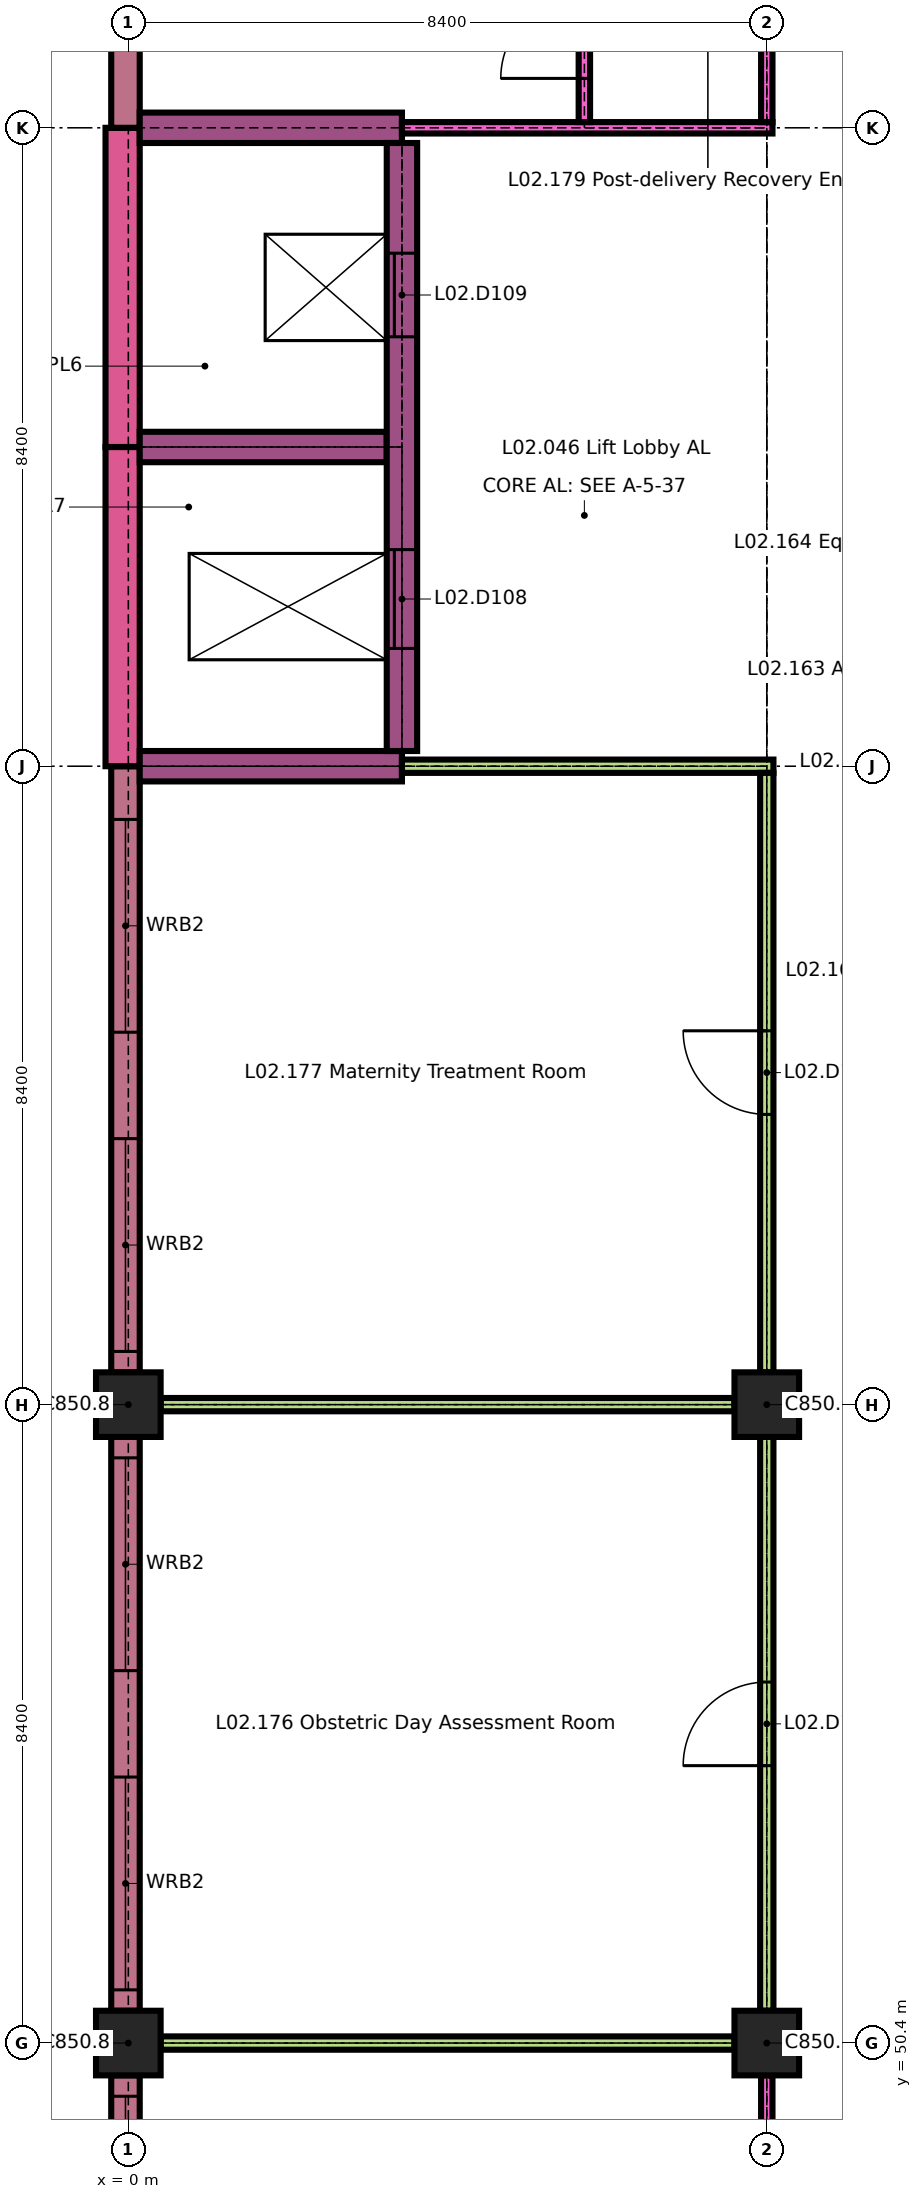
"""IFC4 building model, lengths in metres.
Left out: names, types, materials, properties, quantities, classifications, styles, units other than length and angle.
Written with IfcOpenShell. Run it as: python <this file> out.ifc"""

import sys

from ifc_helpers import new_model, si_unit, direction, frame, frame_2d, origin, origin_2d, place, context, subcontext, project, spatial, rectangle, extrude, element, fill, save


model = new_model("IFC4")
c1 = context("Model", 3, precision=1e-05, world=origin(), true_north=direction((0.0, 1.0)))
c2 = subcontext(c1, "Body", "Model", "MODEL_VIEW")
j1 = project(units=[si_unit("LENGTHUNIT", "METRE"), si_unit("PLANEANGLEUNIT", "RADIAN")], contexts=[c1])
p1 = place(None, origin())
s1 = spatial("IfcSite", under=j1, at=p1, CompositionType="ELEMENT")
p2 = place(p1, origin())
s2 = spatial("IfcBuilding", under=s1, at=p2, CompositionType="ELEMENT")
p3 = place(p2, frame((0.0, 0.0, 8.4)))
s3 = spatial("IfcBuildingStorey", under=s2, at=p3, CompositionType="ELEMENT", Elevation=8.4)
for number, where, z_axis, x_axis in (
    (1, (0.0, 50.4, 0.0), (0.0, 0.0, 1.0), (1.0, 0.0, 0.0)),
    (2, (8.4, 50.4, 0.0), (0.0, 0.0, 1.0), (1.0, 0.0, 0.0)),
    (3, (0.0, 58.8, 0.0), (0.0, 0.0, 1.0), (1.0, 0.0, 0.0)),
    (4, (8.4, 58.8, 0.0), (0.0, 0.0, 1.0), (1.0, 0.0, 0.0)),
):
    element("IfcColumn", number, at=place(p3, frame(where, z_axis=z_axis, x_axis=x_axis)), inside=s3, PredefinedType="COLUMN", context=c2, shape_type="SweptSolid", body=[
        extrude(rectangle(XDim=0.85, YDim=0.85, at=origin_2d()), origin(), (0.0, 0.0, 1.0), 4.2),
    ])
p4 = place(p3, frame((-0.038, 42.425, 0.0), z_axis=(0.0, 0.0, 1.0), x_axis=(0.0, 1.0, 0.0)))
e5 = element("IfcWall", 5, at=p4, inside=s3, PredefinedType="SOLIDWALL", context=c2, shape_type="SweptSolid", body=[
    extrude(rectangle(XDim=7.55, YDim=0.375, at=frame_2d((3.775, 0.0))), origin(), (0.0, 0.0, 1.0), 3.9),
])
p5 = place(p4, frame((0.275, 0.0, 1.0)))
e6 = element("IfcOpeningElement", 6, at=p5, cuts=e5, PredefinedType="OPENING", context=c2, shape_type="SweptSolid", body=[
    extrude(rectangle(XDim=2.8, YDim=1.5, at=frame_2d((1.4, 0.75))), frame((0.0, 0.198, 0.0), z_axis=(0.0, -1.0, 0.0), x_axis=(1.0, 0.0, 0.0)), (0.0, 0.0, 1.0), 0.395),
])
p6 = place(p4, frame((4.475, 0.0, 1.0)))
e7 = element("IfcOpeningElement", 7, at=p6, cuts=e5, PredefinedType="OPENING", context=c2, shape_type="SweptSolid", body=[
    extrude(rectangle(XDim=2.8, YDim=1.5, at=frame_2d((1.4, 0.75))), frame((0.0, 0.198, 0.0), z_axis=(0.0, -1.0, 0.0), x_axis=(1.0, 0.0, 0.0)), (0.0, 0.0, 1.0), 0.395),
])
p7 = place(p3, frame((-0.038, 50.825, 0.0), z_axis=(0.0, 0.0, 1.0), x_axis=(0.0, 1.0, 0.0)))
e8 = element("IfcWall", 8, at=p7, inside=s3, PredefinedType="SOLIDWALL", context=c2, shape_type="SweptSolid", body=[
    extrude(rectangle(XDim=7.55, YDim=0.375, at=frame_2d((3.775, 0.0))), origin(), (0.0, 0.0, 1.0), 3.9),
])
p8 = place(p7, frame((0.275, 0.0, 1.0)))
e9 = element("IfcOpeningElement", 9, at=p8, cuts=e8, PredefinedType="OPENING", context=c2, shape_type="SweptSolid", body=[
    extrude(rectangle(XDim=2.8, YDim=1.5, at=frame_2d((1.4, 0.75))), frame((0.0, 0.198, 0.0), z_axis=(0.0, -1.0, 0.0), x_axis=(1.0, 0.0, 0.0)), (0.0, 0.0, 1.0), 0.395),
])
p9 = place(p7, frame((4.475, 0.0, 1.0)))
e10 = element("IfcOpeningElement", 10, at=p9, cuts=e8, PredefinedType="OPENING", context=c2, shape_type="SweptSolid", body=[
    extrude(rectangle(XDim=2.8, YDim=1.5, at=frame_2d((1.4, 0.75))), frame((0.0, 0.198, 0.0), z_axis=(0.0, -1.0, 0.0), x_axis=(1.0, 0.0, 0.0)), (0.0, 0.0, 1.0), 0.395),
])
p10 = place(p3, frame((-0.038, 59.225, 0.0), z_axis=(0.0, 0.0, 1.0), x_axis=(0.0, 1.0, 0.0)))
e11 = element("IfcWall", 11, at=p10, inside=s3, PredefinedType="SOLIDWALL", context=c2, shape_type="SweptSolid", body=[
    extrude(rectangle(XDim=7.975, YDim=0.375, at=frame_2d((3.987, 0.0))), origin(), (0.0, 0.0, 1.0), 3.9),
])
p11 = place(p10, frame((0.275, 0.0, 1.0)))
e12 = element("IfcOpeningElement", 12, at=p11, cuts=e11, PredefinedType="OPENING", context=c2, shape_type="SweptSolid", body=[
    extrude(rectangle(XDim=2.8, YDim=1.5, at=frame_2d((1.4, 0.75))), frame((0.0, 0.198, 0.0), z_axis=(0.0, -1.0, 0.0), x_axis=(1.0, 0.0, 0.0)), (0.0, 0.0, 1.0), 0.395),
])
p12 = place(p10, frame((4.475, 0.0, 1.0)))
e13 = element("IfcOpeningElement", 13, at=p12, cuts=e11, PredefinedType="OPENING", context=c2, shape_type="SweptSolid", body=[
    extrude(rectangle(XDim=2.8, YDim=1.5, at=frame_2d((1.4, 0.75))), frame((0.0, 0.198, 0.0), z_axis=(0.0, -1.0, 0.0), x_axis=(1.0, 0.0, 0.0)), (0.0, 0.0, 1.0), 0.395),
])
p13 = place(p3, frame((-0.075, 67.2, 0.0), z_axis=(0.0, 0.0, 1.0), x_axis=(0.0, 1.0, 0.0)))
e14 = element("IfcWall", 14, at=p13, inside=s3, PredefinedType="SOLIDWALL", context=c2, shape_type="SweptSolid", body=[
    extrude(rectangle(XDim=4.2, YDim=0.45, at=frame_2d((2.1, 0.0))), origin(), (0.0, 0.0, 1.0), 4.2),
])
p14 = place(p3, frame((-0.075, 71.4, 0.0), z_axis=(0.0, 0.0, 1.0), x_axis=(0.0, 1.0, 0.0)))
e15 = element("IfcWall", 15, at=p14, inside=s3, PredefinedType="SOLIDWALL", context=c2, shape_type="SweptSolid", body=[
    extrude(rectangle(XDim=4.2, YDim=0.45, at=frame_2d((2.1, 0.0))), origin(), (0.0, 0.0, 1.0), 4.2),
])
p15 = place(p3, frame((-0.038, 75.6, 0.0), z_axis=(0.0, 0.0, 1.0), x_axis=(0.0, 1.0, 0.0)))
e16 = element("IfcWall", 16, at=p15, inside=s3, PredefinedType="SOLIDWALL", context=c2, shape_type="SweptSolid", body=[
    extrude(rectangle(XDim=5.25, YDim=0.375, at=frame_2d((2.625, 0.0))), origin(), (0.0, 0.0, 1.0), 3.9),
])
for number, where, z_axis, x_axis in (
    (17, (0.425, 50.4, 0.0), (0.0, 0.0, 1.0), (1.0, 0.0, 0.0)),
    (18, (0.425, 58.8, 0.0), (0.0, 0.0, 1.0), (1.0, 0.0, 0.0)),
):
    element("IfcWall", number, at=place(p3, frame(where, z_axis=z_axis, x_axis=x_axis)), inside=s3, PredefinedType="PARTITIONING", context=c2, shape_type="SweptSolid", body=[
        extrude(rectangle(XDim=7.55, YDim=0.175, at=frame_2d((3.775, 0.0))), origin(), (0.0, 0.0, 1.0), 4.2),
    ])
p16 = place(p3, frame((0.15, 67.2, 0.0), z_axis=(0.0, 0.0, 1.0), x_axis=(1.0, 0.0, 0.0)))
e19 = element("IfcWall", 19, at=p16, inside=s3, PredefinedType="SHEAR", context=c2, shape_type="SweptSolid", body=[
    extrude(rectangle(XDim=3.45, YDim=0.4, at=frame_2d((1.725, 0.0))), origin(), (0.0, 0.0, 1.0), 4.2),
])
p17 = place(p3, frame((3.6, 67.2, 0.0), z_axis=(0.0, 0.0, 1.0), x_axis=(1.0, 0.0, 0.0)))
e20 = element("IfcWall", 20, at=p17, inside=s3, PredefinedType="PARTITIONING", context=c2, shape_type="SweptSolid", body=[
    extrude(rectangle(XDim=4.887, YDim=0.175, at=frame_2d((2.444, 0.0))), origin(), (0.0, 0.0, 1.0), 4.2),
])
p18 = place(p3, frame((0.15, 71.4, 0.0), z_axis=(0.0, 0.0, 1.0), x_axis=(1.0, 0.0, 0.0)))
e21 = element("IfcWall", 21, at=p18, inside=s3, PredefinedType="SHEAR", context=c2, shape_type="SweptSolid", body=[
    extrude(rectangle(XDim=3.25, YDim=0.4, at=frame_2d((1.625, 0.0))), origin(), (0.0, 0.0, 1.0), 4.2),
])
p19 = place(p3, frame((0.15, 75.6, 0.0), z_axis=(0.0, 0.0, 1.0), x_axis=(1.0, 0.0, 0.0)))
e22 = element("IfcWall", 22, at=p19, inside=s3, PredefinedType="SHEAR", context=c2, shape_type="SweptSolid", body=[
    extrude(rectangle(XDim=3.45, YDim=0.4, at=frame_2d((1.725, 0.0))), origin(), (0.0, 0.0, 1.0), 4.2),
])
p20 = place(p3, frame((3.6, 75.6, 0.0), z_axis=(0.0, 0.0, 1.0), x_axis=(1.0, 0.0, 0.0)))
e23 = element("IfcWall", 23, at=p20, inside=s3, PredefinedType="PARTITIONING", context=c2, shape_type="SweptSolid", body=[
    extrude(rectangle(XDim=4.875, YDim=0.15, at=frame_2d((2.438, 0.0))), origin(), (0.0, 0.0, 1.0), 4.2),
])
p21 = place(p3, frame((3.6, 67.4, 0.0), z_axis=(0.0, 0.0, 1.0), x_axis=(0.0, 1.0, 0.0)))
e24 = element("IfcWall", 24, at=p21, inside=s3, PredefinedType="SHEAR", context=c2, shape_type="SweptSolid", body=[
    extrude(rectangle(XDim=8.0, YDim=0.4, at=frame_2d((4.0, 0.0))), origin(), (0.0, 0.0, 1.0), 4.2),
])
p22 = place(p21, frame((1.35, 0.0, 0.0)))
e25 = element("IfcOpeningElement", 25, at=p22, cuts=e24, PredefinedType="OPENING", context=c2, shape_type="SweptSolid", body=[
    extrude(rectangle(XDim=1.3, YDim=2.1, at=frame_2d((0.65, 1.05))), frame((0.0, 0.21, 0.0), z_axis=(0.0, -1.0, 0.0), x_axis=(1.0, 0.0, 0.0)), (0.0, 0.0, 1.0), 0.42),
])
p23 = place(p21, frame((5.45, 0.0, 0.0)))
e26 = element("IfcOpeningElement", 26, at=p23, cuts=e24, PredefinedType="OPENING", context=c2, shape_type="SweptSolid", body=[
    extrude(rectangle(XDim=1.1, YDim=2.1, at=frame_2d((0.55, 1.05))), frame((0.0, 0.21, 0.0), z_axis=(0.0, -1.0, 0.0), x_axis=(1.0, 0.0, 0.0)), (0.0, 0.0, 1.0), 0.42),
])
p24 = place(p3, frame((6.0, 75.675, 0.0), z_axis=(0.0, 0.0, 1.0), x_axis=(0.0, 1.0, 0.0)))
e27 = element("IfcWall", 27, at=p24, inside=s3, PredefinedType="PARTITIONING", context=c2, shape_type="SweptSolid", body=[
    extrude(rectangle(XDim=2.25, YDim=0.15, at=frame_2d((1.125, 0.0))), origin(), (0.0, 0.0, 1.0), 4.2),
])
p25 = place(p24, frame((0.575, 0.0, 0.0)))
e28 = element("IfcOpeningElement", 28, at=p25, cuts=e27, PredefinedType="OPENING", context=c2, shape_type="SweptSolid", body=[
    extrude(rectangle(XDim=1.1, YDim=2.1, at=frame_2d((0.55, 1.05))), frame((0.0, 0.085, 0.0), z_axis=(0.0, -1.0, 0.0), x_axis=(1.0, 0.0, 0.0)), (0.0, 0.0, 1.0), 0.17),
])
p26 = place(p3, frame((8.4, 42.425, 0.0), z_axis=(0.0, 0.0, 1.0), x_axis=(0.0, 1.0, 0.0)))
e29 = element("IfcWall", 29, at=p26, inside=s3, PredefinedType="PARTITIONING", context=c2, shape_type="SweptSolid", body=[
    extrude(rectangle(XDim=7.55, YDim=0.15, at=frame_2d((3.775, 0.0))), origin(), (0.0, 0.0, 1.0), 4.2),
])
p27 = place(p26, frame((3.225, 0.0, 0.0)))
e30 = element("IfcOpeningElement", 30, at=p27, cuts=e29, PredefinedType="OPENING", context=c2, shape_type="SweptSolid", body=[
    extrude(rectangle(XDim=1.1, YDim=2.1, at=frame_2d((0.55, 1.05))), frame((0.0, 0.085, 0.0), z_axis=(0.0, -1.0, 0.0), x_axis=(1.0, 0.0, 0.0)), (0.0, 0.0, 1.0), 0.17),
])
p28 = place(p3, frame((8.4, 50.825, 0.0), z_axis=(0.0, 0.0, 1.0), x_axis=(0.0, 1.0, 0.0)))
e31 = element("IfcWall", 31, at=p28, inside=s3, PredefinedType="PARTITIONING", context=c2, shape_type="SweptSolid", body=[
    extrude(rectangle(XDim=7.55, YDim=0.175, at=frame_2d((3.775, 0.0))), origin(), (0.0, 0.0, 1.0), 4.2),
])
p29 = place(p28, frame((3.225, 0.0, 0.0)))
e32 = element("IfcOpeningElement", 32, at=p29, cuts=e31, PredefinedType="OPENING", context=c2, shape_type="SweptSolid", body=[
    extrude(rectangle(XDim=1.1, YDim=2.1, at=frame_2d((0.55, 1.05))), frame((0.0, 0.097, 0.0), z_axis=(0.0, -1.0, 0.0), x_axis=(1.0, 0.0, 0.0)), (0.0, 0.0, 1.0), 0.195),
])
p30 = place(p3, frame((8.4, 59.225, 0.0), z_axis=(0.0, 0.0, 1.0), x_axis=(0.0, 1.0, 0.0)))
e33 = element("IfcWall", 33, at=p30, inside=s3, PredefinedType="PARTITIONING", context=c2, shape_type="SweptSolid", body=[
    extrude(rectangle(XDim=7.887, YDim=0.175, at=frame_2d((3.944, 0.0))), origin(), (0.0, 0.0, 1.0), 4.2),
])
p31 = place(p30, frame((3.394, 0.0, 0.0)))
e34 = element("IfcOpeningElement", 34, at=p31, cuts=e33, PredefinedType="OPENING", context=c2, shape_type="SweptSolid", body=[
    extrude(rectangle(XDim=1.1, YDim=2.1, at=frame_2d((0.55, 1.05))), frame((0.0, 0.097, 0.0), z_axis=(0.0, -1.0, 0.0), x_axis=(1.0, 0.0, 0.0)), (0.0, 0.0, 1.0), 0.195),
])
p32 = place(p3, frame((8.4, 75.675, 0.0), z_axis=(0.0, 0.0, 1.0), x_axis=(0.0, 1.0, 0.0)))
e35 = element("IfcWall", 35, at=p32, inside=s3, PredefinedType="PARTITIONING", context=c2, shape_type="SweptSolid", body=[
    extrude(rectangle(XDim=7.9, YDim=0.15, at=frame_2d((3.95, 0.0))), origin(), (0.0, 0.0, 1.0), 4.2),
])
p33 = place(p32, frame((3.0, 0.0, 0.0)))
e36 = element("IfcOpeningElement", 36, at=p33, cuts=e35, PredefinedType="OPENING", context=c2, shape_type="SweptSolid", body=[
    extrude(rectangle(XDim=1.5, YDim=2.4, at=frame_2d((0.75, 1.2))), frame((0.0, 0.085, 0.0), z_axis=(0.0, -1.0, 0.0), x_axis=(1.0, 0.0, 0.0)), (0.0, 0.0, 1.0), 0.17),
])
p34 = place(p32, frame((5.788, 0.0, 0.0)))
e37 = element("IfcOpeningElement", 37, at=p34, cuts=e35, PredefinedType="OPENING", context=c2, shape_type="SweptSolid", body=[
    extrude(rectangle(XDim=1.5, YDim=2.4, at=frame_2d((0.75, 1.2))), frame((0.0, 0.085, 0.0), z_axis=(0.0, -1.0, 0.0), x_axis=(1.0, 0.0, 0.0)), (0.0, 0.0, 1.0), 0.17),
])
p35 = place(p6, origin())
e38 = element("IfcWindow", 38, at=p35, inside=s3, PartitioningType="DOUBLE_PANEL_VERTICAL", PredefinedType="WINDOW", context=c2, shape_type="SweptSolid", body=[
    extrude(rectangle(XDim=2.8, YDim=1.5, at=frame_2d((1.4, 0.75))), frame((0.0, 0.03, 0.0), z_axis=(0.0, -1.0, 0.0), x_axis=(1.0, 0.0, 0.0)), (0.0, 0.0, 1.0), 0.06),
])
fill(e7, e38)
p36 = place(p8, origin())
e39 = element("IfcWindow", 39, at=p36, inside=s3, PartitioningType="DOUBLE_PANEL_VERTICAL", PredefinedType="WINDOW", context=c2, shape_type="SweptSolid", body=[
    extrude(rectangle(XDim=2.8, YDim=1.5, at=frame_2d((1.4, 0.75))), frame((0.0, 0.03, 0.0), z_axis=(0.0, -1.0, 0.0), x_axis=(1.0, 0.0, 0.0)), (0.0, 0.0, 1.0), 0.06),
])
fill(e9, e39)
p37 = place(p9, origin())
e40 = element("IfcWindow", 40, at=p37, inside=s3, PartitioningType="DOUBLE_PANEL_VERTICAL", PredefinedType="WINDOW", context=c2, shape_type="SweptSolid", body=[
    extrude(rectangle(XDim=2.8, YDim=1.5, at=frame_2d((1.4, 0.75))), frame((0.0, 0.03, 0.0), z_axis=(0.0, -1.0, 0.0), x_axis=(1.0, 0.0, 0.0)), (0.0, 0.0, 1.0), 0.06),
])
fill(e10, e40)
p38 = place(p11, origin())
e41 = element("IfcWindow", 41, at=p38, inside=s3, PartitioningType="DOUBLE_PANEL_VERTICAL", PredefinedType="WINDOW", context=c2, shape_type="SweptSolid", body=[
    extrude(rectangle(XDim=2.8, YDim=1.5, at=frame_2d((1.4, 0.75))), frame((0.0, 0.03, 0.0), z_axis=(0.0, -1.0, 0.0), x_axis=(1.0, 0.0, 0.0)), (0.0, 0.0, 1.0), 0.06),
])
fill(e12, e41)
p39 = place(p12, origin())
e42 = element("IfcWindow", 42, at=p39, inside=s3, PartitioningType="DOUBLE_PANEL_VERTICAL", PredefinedType="WINDOW", context=c2, shape_type="SweptSolid", body=[
    extrude(rectangle(XDim=2.8, YDim=1.5, at=frame_2d((1.4, 0.75))), frame((0.0, 0.03, 0.0), z_axis=(0.0, -1.0, 0.0), x_axis=(1.0, 0.0, 0.0)), (0.0, 0.0, 1.0), 0.06),
])
fill(e13, e42)
p40 = place(p22, origin())
e43 = element("IfcDoor", 43, at=p40, inside=s3, OperationType="SLIDING_TO_LEFT", PredefinedType="DOOR", context=c2, shape_type="SweptSolid", body=[
    extrude(rectangle(XDim=1.3, YDim=2.1, at=frame_2d((0.65, 1.05))), frame((0.0, 0.025, 0.0), z_axis=(0.0, -1.0, 0.0), x_axis=(1.0, 0.0, 0.0)), (0.0, 0.0, 1.0), 0.05),
])
fill(e25, e43)
p41 = place(p23, origin())
e44 = element("IfcDoor", 44, at=p41, inside=s3, OperationType="SLIDING_TO_LEFT", PredefinedType="DOOR", context=c2, shape_type="SweptSolid", body=[
    extrude(rectangle(XDim=1.1, YDim=2.1, at=frame_2d((0.55, 1.05))), frame((0.0, 0.025, 0.0), z_axis=(0.0, -1.0, 0.0), x_axis=(1.0, 0.0, 0.0)), (0.0, 0.0, 1.0), 0.05),
])
fill(e26, e44)
p42 = place(p25, origin())
e45 = element("IfcDoor", 45, at=p42, inside=s3, OperationType="SINGLE_SWING_RIGHT", PredefinedType="DOOR", context=c2, shape_type="SweptSolid", body=[
    extrude(rectangle(XDim=1.1, YDim=2.1, at=frame_2d((0.55, 1.05))), frame((0.0, 0.025, 0.0), z_axis=(0.0, -1.0, 0.0), x_axis=(1.0, 0.0, 0.0)), (0.0, 0.0, 1.0), 0.05),
])
fill(e28, e45)
p43 = place(p29, origin())
e46 = element("IfcDoor", 46, at=p43, inside=s3, OperationType="SINGLE_SWING_RIGHT", PredefinedType="DOOR", context=c2, shape_type="SweptSolid", body=[
    extrude(rectangle(XDim=1.1, YDim=2.1, at=frame_2d((0.55, 1.05))), frame((0.0, 0.035, 0.0), z_axis=(0.0, -1.0, 0.0), x_axis=(1.0, 0.0, 0.0)), (0.0, 0.0, 1.0), 0.07),
])
fill(e32, e46)
p44 = place(p31, origin())
e47 = element("IfcDoor", 47, at=p44, inside=s3, OperationType="SINGLE_SWING_LEFT", PredefinedType="DOOR", context=c2, shape_type="SweptSolid", body=[
    extrude(rectangle(XDim=1.1, YDim=2.1, at=frame_2d((0.55, 1.05))), frame((0.0, 0.035, 0.0), z_axis=(0.0, -1.0, 0.0), x_axis=(1.0, 0.0, 0.0)), (0.0, 0.0, 1.0), 0.07),
])
fill(e34, e47)
save(model, sys.argv[1])
